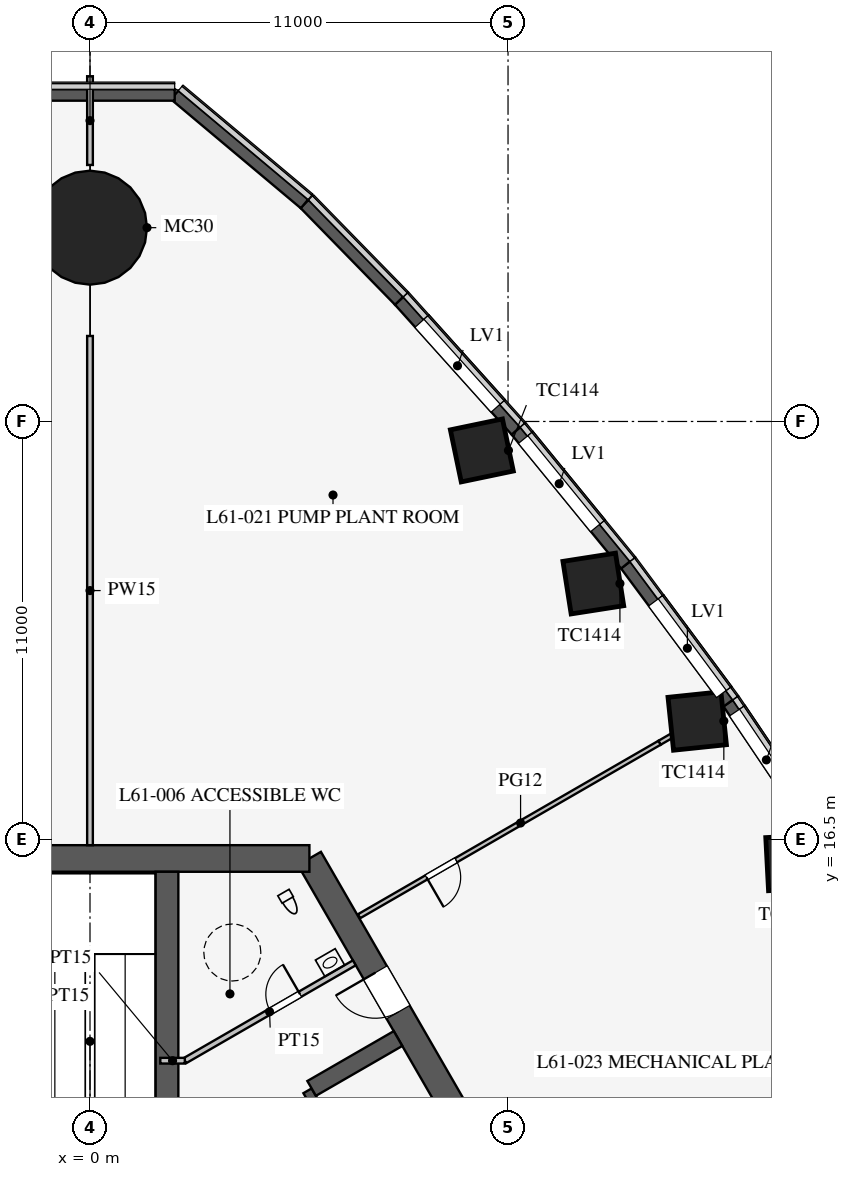
"""IFC4 building model, lengths in metres.
Left out: names, types, materials, properties, quantities, classifications, styles, units other than length and angle.
Written with IfcOpenShell. Run it as: python <this file> out.ifc"""

import sys

from ifc_helpers import new_model, si_unit, direction, frame, frame_2d, origin, origin_2d, place, context, subcontext, project, spatial, polyline, rectangle, circle, outline, extrude, clip, halfspace, element, fill, save


model = new_model("IFC4")
c1 = context("Model", 3, precision=1e-05, world=origin(), true_north=direction((0.0, 1.0)))
c2 = subcontext(c1, "Body", "Model", "MODEL_VIEW")
j1 = project(units=[si_unit("LENGTHUNIT", "METRE"), si_unit("PLANEANGLEUNIT", "RADIAN")], contexts=[c1])
p1 = place(None, origin())
s1 = spatial("IfcSite", under=j1, at=p1, CompositionType="ELEMENT")
p2 = place(p1, origin())
s2 = spatial("IfcBuilding", under=s1, at=p2, CompositionType="ELEMENT")
p3 = place(p2, frame((0.0, 0.0, 265.3)))
s3 = spatial("IfcBuildingStorey", under=s2, at=p3, CompositionType="ELEMENT", Elevation=265.3)
p4 = place(p3, frame((18.748, 16.02, 0.0), z_axis=(-0.187766955789, -0.108401950994, 0.976213392315), x_axis=(-0.543261997309, 0.839487539175, -0.01127270373)))
e1 = element("IfcColumn", 1, at=p4, inside=s3, PredefinedType="COLUMN", context=c2, shape_type="Clipping", body=[
    clip(clip(extrude(rectangle(XDim=1.4, YDim=1.4, at=origin_2d()), origin(), (0.0, 0.0, 1.0), 6.146), halfspace(frame((0.0, 0.0, 0.164), z_axis=(-5.122421756978066e-06, -9.263174689327915e-06, 0.9999999999439773), x_axis=(0.0, 0.9999999999570969, 9.263174689449444e-06)), True)), halfspace(frame((0.0, 0.0, 5.982), z_axis=(5.122421756978066e-06, 9.263174689327915e-06, -0.9999999999439773), x_axis=(0.0, -0.9999999999570969, -9.263174689449444e-06)), True)),
])
p5 = place(p3, frame((16.227, 19.761, 0.0), z_axis=(-0.201282046639, -0.116233851942, 0.972612579275), x_axis=(-0.584672708009, 0.810911567532, -0.024088465132)))
e2 = element("IfcColumn", 2, at=p5, inside=s3, PredefinedType="COLUMN", context=c2, shape_type="Clipping", body=[
    clip(clip(extrude(rectangle(XDim=1.4, YDim=1.4, at=origin_2d()), origin(), (0.0, 0.0, 1.0), 6.169), halfspace(frame((0.0, 0.0, 0.185), z_axis=(1.9384733546467386e-05, -1.123718108159144e-05, 0.999999999748979), x_axis=(0.0, 0.999999999936863, 1.1237181083702726e-05)), True)), halfspace(frame((0.0, 0.0, 5.984), z_axis=(-1.9384733546467386e-05, 1.123718108159144e-05, -0.999999999748979), x_axis=(0.0, -0.999999999936863, -1.1237181083702726e-05)), True)),
])
p6 = place(p3, frame((13.522, 23.396, 0.0), z_axis=(-0.223892186637, -0.129241135826, 0.966006737851), x_axis=(-0.623193661638, 0.78104689372, -0.039942582606)))
e3 = element("IfcColumn", 3, at=p6, inside=s3, PredefinedType="COLUMN", context=c2, shape_type="Clipping", body=[
    clip(clip(extrude(rectangle(XDim=1.4, YDim=1.4, at=origin_2d()), origin(), (0.0, 0.0, 1.0), 6.211), halfspace(frame((0.0, 0.0, 0.215), z_axis=(-2.063244910444073e-05, -2.579208150971235e-06, 0.9999999997838249), x_axis=(0.0, 0.9999999999966739, 2.579208151520217e-06)), True)), halfspace(frame((0.0, 0.0, 5.996), z_axis=(2.063244910444073e-05, 2.579208150971235e-06, -0.9999999997838249), x_axis=(0.0, -0.9999999999966739, -2.579208151520217e-06)), True)),
])
p7 = place(p3, frame((10.632, 26.923, 0.0), z_axis=(-0.255546793754, -0.147542991373, 0.955472083265), x_axis=(-0.65837980311, 0.750272089652, -0.060231439844)))
e4 = element("IfcColumn", 4, at=p7, inside=s3, PredefinedType="COLUMN", context=c2, shape_type="Clipping", body=[
    clip(clip(extrude(rectangle(XDim=1.4, YDim=1.4, at=origin_2d()), origin(), (0.0, 0.0, 1.0), 6.28), halfspace(frame((0.0, 0.0, 0.257), z_axis=(-2.541375274736635e-06, -2.483352466137179e-05, 0.9999999996884188), x_axis=(0.0, 0.9999999996916481, 2.4833524661451983e-05)), True)), halfspace(frame((0.0, 0.0, 6.023), z_axis=(2.541375274736635e-06, 2.483352466137179e-05, -0.9999999996884188), x_axis=(0.0, -0.9999999996916481, -2.4833524661451983e-05)), True)),
])
p8 = place(p3, frame((0.0, 33.0, 0.0), z_axis=(0.0, -0.316227766017, 0.948683298051), x_axis=(1.0, 0.0, 0.0)))
e5 = element("IfcColumn", 5, at=p8, inside=s3, PredefinedType="COLUMN", context=c2, shape_type="Clipping", body=[
    clip(clip(extrude(circle(Radius=1.5, at=origin_2d()), origin(), (0.0, 0.0, 1.0), 6.324), halfspace(frame((0.0, 0.0, 0.501), z_axis=(0.0, 0.0, 1.0), x_axis=(0.0, 1.0, 0.0)), True)), halfspace(frame((0.0, 0.0, 5.823), z_axis=(0.0, 0.0, -1.0), x_axis=(0.0, -1.0, 0.0)), True)),
])
p9 = place(p3, frame((16.743, -3.0, 0.0), z_axis=(0.0, 0.0, 1.0), x_axis=(-0.500002442456, 0.866023993627, 0.0)))
e6 = element("IfcWall", 6, at=p9, inside=s3, PredefinedType="SHEAR", context=c2, shape_type="SweptSolid", body=[
    extrude(rectangle(XDim=21.939, YDim=0.7, at=frame_2d((10.97, 0.0))), origin(), (0.0, 0.0, 1.0), 6.0),
])
p10 = place(p9, frame((17.27, 0.0, 0.0)))
e7 = element("IfcOpeningElement", 7, at=p10, cuts=e6, PredefinedType="OPENING", context=c2, shape_type="SweptSolid", body=[
    extrude(rectangle(XDim=1.2, YDim=2.1, at=frame_2d((0.6, 1.05))), frame((0.0, 0.36, 0.0), z_axis=(0.0, -1.0, 0.0), x_axis=(1.0, 0.0, 0.0)), (0.0, 0.0, 1.0), 0.72),
])
p11 = place(p9, frame((3.47, 0.0, 0.0)))
e8 = element("IfcOpeningElement", 8, at=p11, cuts=e6, PredefinedType="OPENING", context=c2, shape_type="SweptSolid", body=[
    extrude(rectangle(XDim=1.2, YDim=2.1, at=frame_2d((0.6, 1.05))), frame((0.0, 0.36, 0.0), z_axis=(0.0, -1.0, 0.0), x_axis=(1.0, 0.0, 0.0)), (0.0, 0.0, 1.0), 0.72),
])
p12 = place(p3, frame((5.773, 16.0, 0.0), z_axis=(0.0, 0.0, 1.0), x_axis=(-1.0, 0.0, 0.0)))
e9 = element("IfcWall", 9, at=p12, inside=s3, PredefinedType="SHEAR", context=c2, shape_type="SweptSolid", body=[
    extrude(rectangle(XDim=11.547, YDim=0.7, at=frame_2d((5.773, 0.0))), origin(), (0.0, 0.0, 1.0), 6.0),
])
p13 = place(p3, frame((11.424, 0.014, 0.0), z_axis=(0.0, 0.0, 1.0), x_axis=(-0.500001763848, 0.866024385424, 0.0)))
e10 = element("IfcWall", 10, at=p13, inside=s3, PredefinedType="SHEAR", context=c2, shape_type="SweptSolid", body=[
    extrude(rectangle(XDim=11.4, YDim=0.25, at=frame_2d((5.7, 0.0))), origin(), (0.0, 0.0, 1.0), 6.0),
])
p14 = place(p13, frame((0.975, 0.0, 0.0)))
e11 = element("IfcOpeningElement", 11, at=p14, cuts=e10, PredefinedType="OPENING", context=c2, shape_type="SweptSolid", body=[
    extrude(rectangle(XDim=0.9, YDim=2.1, at=frame_2d((0.45, 1.05))), frame((0.0, 0.135, 0.0), z_axis=(0.0, -1.0, 0.0), x_axis=(1.0, 0.0, 0.0)), (0.0, 0.0, 1.0), 0.27),
])
p15 = place(p13, frame((3.825, 0.0, 0.0)))
e12 = element("IfcOpeningElement", 12, at=p15, cuts=e10, PredefinedType="OPENING", context=c2, shape_type="SweptSolid", body=[
    extrude(rectangle(XDim=0.9, YDim=2.1, at=frame_2d((0.45, 1.05))), frame((0.0, 0.135, 0.0), z_axis=(0.0, -1.0, 0.0), x_axis=(1.0, 0.0, 0.0)), (0.0, 0.0, 1.0), 0.27),
])
p16 = place(p13, frame((6.675, 0.0, 0.0)))
e13 = element("IfcOpeningElement", 13, at=p16, cuts=e10, PredefinedType="OPENING", context=c2, shape_type="SweptSolid", body=[
    extrude(rectangle(XDim=0.9, YDim=2.1, at=frame_2d((0.45, 1.05))), frame((0.0, 0.135, 0.0), z_axis=(0.0, -1.0, 0.0), x_axis=(1.0, 0.0, 0.0)), (0.0, 0.0, 1.0), 0.27),
])
p17 = place(p13, frame((9.525, 0.0, 0.0)))
e14 = element("IfcOpeningElement", 14, at=p17, cuts=e10, PredefinedType="OPENING", context=c2, shape_type="SweptSolid", body=[
    extrude(rectangle(XDim=0.9, YDim=2.1, at=frame_2d((0.45, 1.05))), frame((0.0, 0.135, 0.0), z_axis=(0.0, -1.0, 0.0), x_axis=(1.0, 0.0, 0.0)), (0.0, 0.0, 1.0), 0.27),
])
p18 = place(p3, frame((5.832, 9.949, 0.0), z_axis=(0.0, 0.0, 1.0), x_axis=(0.866036909293, 0.499980071345, 0.0)))
e15 = element("IfcWall", 15, at=p18, inside=s3, PredefinedType="SHEAR", context=c2, shape_type="SweptSolid", body=[
    extrude(rectangle(XDim=2.625, YDim=0.45, at=frame_2d((1.312, 0.0))), origin(), (0.0, 0.0, 1.0), 6.0),
])
p19 = place(p3, frame((2.025, 6.525, 0.0), z_axis=(0.0, 0.0, 1.0), x_axis=(0.0, 1.0, 0.0)))
e16 = element("IfcWall", 16, at=p19, inside=s3, PredefinedType="SHEAR", context=c2, shape_type="SweptSolid", body=[
    extrude(rectangle(XDim=9.125, YDim=0.6, at=frame_2d((4.562, 0.0))), origin(), (0.0, 0.0, 1.0), 6.0),
])
p20 = place(p3, frame((19.312, 16.346, 0.0), z_axis=(0.0, 0.0, 1.0), x_axis=(-0.558466624917, 0.829526991034, 0.0)))
e17 = element("IfcWall", 17, at=p20, inside=s3, PredefinedType="SOLIDWALL", context=c2, shape_type="SweptSolid", body=[
    extrude(rectangle(XDim=4.511, YDim=0.3, at=frame_2d((2.255, 0.0))), origin(), (0.0, 0.0, 1.0), 5.8),
])
p21 = place(p20, frame((1.211, 0.0, 3.5)))
e18 = element("IfcOpeningElement", 18, at=p21, cuts=e17, PredefinedType="OPENING", context=c2, shape_type="SweptSolid", body=[
    extrude(rectangle(XDim=3.0, YDim=2.0, at=frame_2d((1.5, 1.0))), frame((0.0, 0.16, 0.0), z_axis=(0.0, -1.0, 0.0), x_axis=(1.0, 0.0, 0.0)), (0.0, 0.0, 1.0), 0.32),
])
p22 = place(p3, frame((16.792, 20.087, 0.0), z_axis=(0.0, 0.0, 1.0), x_axis=(-0.596173167565, 0.802855873912, 0.0)))
e19 = element("IfcWall", 19, at=p22, inside=s3, PredefinedType="SOLIDWALL", context=c2, shape_type="SweptSolid", body=[
    extrude(rectangle(XDim=4.53, YDim=0.3, at=frame_2d((2.265, 0.0))), origin(), (0.0, 0.0, 1.0), 5.8),
])
p23 = place(p22, frame((0.3, 0.0, 3.5)))
e20 = element("IfcOpeningElement", 20, at=p23, cuts=e19, PredefinedType="OPENING", context=c2, shape_type="SweptSolid", body=[
    extrude(rectangle(XDim=3.0, YDim=2.0, at=frame_2d((1.5, 1.0))), frame((0.0, 0.16, 0.0), z_axis=(0.0, -1.0, 0.0), x_axis=(1.0, 0.0, 0.0)), (0.0, 0.0, 1.0), 0.32),
])
p24 = place(p3, frame((14.092, 23.724, 0.0), z_axis=(0.0, 0.0, 1.0), x_axis=(-0.632765292047, 0.774343647989, 0.0)))
e21 = element("IfcWall", 21, at=p24, inside=s3, PredefinedType="SOLIDWALL", context=c2, shape_type="SweptSolid", body=[
    extrude(rectangle(XDim=4.559, YDim=0.3, at=frame_2d((2.28, 0.0))), origin(), (0.0, 0.0, 1.0), 5.8),
])
p25 = place(p24, frame((1.259, 0.0, 3.5)))
e22 = element("IfcOpeningElement", 22, at=p25, cuts=e21, PredefinedType="OPENING", context=c2, shape_type="SweptSolid", body=[
    extrude(rectangle(XDim=3.0, YDim=2.0, at=frame_2d((1.5, 1.0))), frame((0.0, 0.16, 0.0), z_axis=(0.0, -1.0, 0.0), x_axis=(1.0, 0.0, 0.0)), (0.0, 0.0, 1.0), 0.32),
])
p26 = place(p3, frame((11.207, 27.255, 0.0), z_axis=(0.0, 0.0, 1.0), x_axis=(-0.668245909458, 0.743940457626, 0.0)))
e23 = element("IfcWall", 23, at=p26, inside=s3, PredefinedType="SOLIDWALL", context=c2, shape_type="SweptSolid", body=[
    extrude(rectangle(XDim=4.599, YDim=0.3, at=frame_2d((2.3, 0.0))), origin(), (0.0, 0.0, 1.0), 5.8),
])
p27 = place(p26, frame((0.8, 0.0, 3.5)))
e24 = element("IfcOpeningElement", 24, at=p27, cuts=e23, PredefinedType="OPENING", context=c2, shape_type="SweptSolid", body=[
    extrude(rectangle(XDim=3.0, YDim=2.0, at=frame_2d((1.5, 1.0))), frame((0.0, 0.16, 0.0), z_axis=(0.0, -1.0, 0.0), x_axis=(1.0, 0.0, 0.0)), (0.0, 0.0, 1.0), 0.32),
])
p28 = place(p3, frame((8.133, 30.677, 0.0), z_axis=(0.0, 0.0, 1.0), x_axis=(-0.698630261643, 0.715482884154, 0.0)))
e25 = element("IfcWall", 25, at=p28, inside=s3, PredefinedType="SOLIDWALL", context=c2, shape_type="SweptSolid", body=[
    extrude(rectangle(XDim=3.564, YDim=0.3, at=frame_2d((1.782, 0.0))), origin(), (0.0, 0.0, 1.0), 5.8),
])
for number, where, z_axis, x_axis in (
    (26, (5.644, 33.226, 0.0), (0.0, 0.0, 1.0), (-0.766, 0.643, 0.0)),
    (27, (2.229, 36.092, 0.0), (0.0, 0.0, 1.0), (-1.0, 0.0, 0.0)),
):
    element("IfcWall", number, at=place(p3, frame(where, z_axis=z_axis, x_axis=x_axis)), inside=s3, PredefinedType="SOLIDWALL", context=c2, shape_type="SweptSolid", body=[
        extrude(rectangle(XDim=4.458, YDim=0.3, at=frame_2d((2.229, 0.0))), origin(), (0.0, 0.0, 1.0), 5.8),
    ])
p29 = place(p3, frame((2.495, 10.678, 0.0), z_axis=(0.0, 0.0, 1.0), x_axis=(0.866037967349, 0.499978238636, 0.0)))
e28 = element("IfcWall", 28, at=p29, inside=s3, PredefinedType="PARTITIONING", context=c2, shape_type="SweptSolid", body=[
    extrude(rectangle(XDim=5.15, YDim=0.15, at=frame_2d((2.575, 0.0))), origin(), (0.0, 0.0, 1.0), 5.8),
])
p30 = place(p29, frame((2.6, 0.0, 0.0)))
e29 = element("IfcOpeningElement", 29, at=p30, cuts=e28, PredefinedType="OPENING", context=c2, shape_type="SweptSolid", body=[
    extrude(rectangle(XDim=0.9, YDim=2.1, at=frame_2d((0.45, 1.05))), frame((0.0, 0.085, 0.0), z_axis=(0.0, -1.0, 0.0), x_axis=(1.0, 0.0, 0.0)), (0.0, 0.0, 1.0), 0.17),
])
p31 = place(p3, frame((2.495, 10.678, 0.0), z_axis=(0.0, 0.0, 1.0), x_axis=(-1.0, 0.0, 0.0)))
e30 = element("IfcWall", 30, at=p31, inside=s3, PredefinedType="PARTITIONING", context=c2, shape_type="SweptSolid", body=[
    extrude(rectangle(XDim=0.645, YDim=0.15, at=frame_2d((0.323, 0.0))), origin(), (0.0, 0.0, 1.0), 5.8),
])
p32 = place(p3, frame((0.0, 16.35, 0.0), z_axis=(0.0, 0.0, 1.0), x_axis=(0.0, 1.0, 0.0)))
e31 = element("IfcWall", 31, at=p32, inside=s3, PredefinedType="PARTITIONING", context=c2, shape_type="SweptSolid", body=[
    extrude(rectangle(XDim=13.4, YDim=0.15, at=frame_2d((6.7, 0.0))), origin(), (0.0, 0.0, 1.0), 4.3),
])
p33 = place(p3, frame((0.0, 34.25, 0.0), z_axis=(0.0, 0.0, 1.0), x_axis=(0.0, 1.0, 0.0)))
e32 = element("IfcWall", 32, at=p33, inside=s3, PredefinedType="PARTITIONING", context=c2, shape_type="SweptSolid", body=[
    extrude(rectangle(XDim=2.335, YDim=0.15, at=frame_2d((1.167, 0.0))), origin(), (0.0, 0.0, 1.0), 5.8),
])
p34 = place(p3, frame((14.986, 19.044, 0.0), z_axis=(0.0, 0.0, 1.0), x_axis=(0.865984622623, 0.500070628392, 0.0)))
e33 = element("IfcWall", 33, at=p34, inside=s3, PredefinedType="PARTITIONING", context=c2, shape_type="SweptSolid", body=[
    extrude(outline(polyline([(0.0, 0.0), (0.688, 0.0), (0.688, 0.05), (0.0, 2.9), (0.0, 0.0)])), frame((0.0, 0.06, 0.0), z_axis=(0.0, -1.0, 0.0), x_axis=(1.0, 0.0, 0.0)), (0.0, 0.0, 1.0), 0.12),
])
p35 = place(p3, frame((7.079, 14.479, 0.0), z_axis=(0.0, 0.0, 1.0), x_axis=(0.866026165896, 0.499998679983, 0.0)))
e34 = element("IfcWall", 34, at=p35, inside=s3, PredefinedType="PARTITIONING", context=c2, shape_type="SweptSolid", body=[
    extrude(rectangle(XDim=9.13, YDim=0.12, at=frame_2d((4.565, 0.0))), origin(), (0.0, 0.0, 1.0), 2.9),
])
p36 = place(p35, frame((2.05, 0.0, 0.0)))
e35 = element("IfcOpeningElement", 35, at=p36, cuts=e34, PredefinedType="OPENING", context=c2, shape_type="SweptSolid", body=[
    extrude(rectangle(XDim=0.9, YDim=2.1, at=frame_2d((0.45, 1.05))), frame((0.0, 0.07, 0.0), z_axis=(0.0, -1.0, 0.0), x_axis=(1.0, 0.0, 0.0)), (0.0, 0.0, 1.0), 0.14),
])
p37 = place(p21, origin())
e36 = element("IfcWindow", 36, at=p37, inside=s3, PartitioningType="SINGLE_PANEL", PredefinedType="USERDEFINED", context=c2, shape_type="SweptSolid", body=[
    extrude(rectangle(XDim=3.0, YDim=2.0, at=frame_2d((1.5, 1.0))), frame((0.0, 0.03, 0.0), z_axis=(0.0, -1.0, 0.0), x_axis=(1.0, 0.0, 0.0)), (0.0, 0.0, 1.0), 0.06),
])
fill(e18, e36)
p38 = place(p23, origin())
e37 = element("IfcWindow", 37, at=p38, inside=s3, PartitioningType="SINGLE_PANEL", PredefinedType="USERDEFINED", context=c2, shape_type="SweptSolid", body=[
    extrude(rectangle(XDim=3.0, YDim=2.0, at=frame_2d((1.5, 1.0))), frame((0.0, 0.03, 0.0), z_axis=(0.0, -1.0, 0.0), x_axis=(1.0, 0.0, 0.0)), (0.0, 0.0, 1.0), 0.06),
])
fill(e20, e37)
p39 = place(p25, origin())
e38 = element("IfcWindow", 38, at=p39, inside=s3, PartitioningType="SINGLE_PANEL", PredefinedType="USERDEFINED", context=c2, shape_type="SweptSolid", body=[
    extrude(rectangle(XDim=3.0, YDim=2.0, at=frame_2d((1.5, 1.0))), frame((0.0, 0.03, 0.0), z_axis=(0.0, -1.0, 0.0), x_axis=(1.0, 0.0, 0.0)), (0.0, 0.0, 1.0), 0.06),
])
fill(e22, e38)
p40 = place(p27, origin())
e39 = element("IfcWindow", 39, at=p40, inside=s3, PartitioningType="SINGLE_PANEL", PredefinedType="USERDEFINED", context=c2, shape_type="SweptSolid", body=[
    extrude(rectangle(XDim=3.0, YDim=2.0, at=frame_2d((1.5, 1.0))), frame((0.0, 0.03, 0.0), z_axis=(0.0, -1.0, 0.0), x_axis=(1.0, 0.0, 0.0)), (0.0, 0.0, 1.0), 0.06),
])
fill(e24, e39)
p41 = place(p30, origin())
e40 = element("IfcDoor", 40, at=p41, inside=s3, OperationType="SINGLE_SWING_RIGHT", PredefinedType="DOOR", context=c2, shape_type="SweptSolid", body=[
    extrude(rectangle(XDim=0.9, YDim=2.1, at=frame_2d((0.45, 1.05))), frame((0.0, 0.025, 0.0), z_axis=(0.0, -1.0, 0.0), x_axis=(1.0, 0.0, 0.0)), (0.0, 0.0, 1.0), 0.05),
])
fill(e29, e40)
p42 = place(p10, origin())
e41 = element("IfcDoor", 41, at=p42, inside=s3, OperationType="SINGLE_SWING_RIGHT", PredefinedType="DOOR", context=c2, shape_type="SweptSolid", body=[
    extrude(rectangle(XDim=1.2, YDim=2.1, at=frame_2d((0.6, 1.05))), frame((0.0, 0.025, 0.0), z_axis=(0.0, -1.0, 0.0), x_axis=(1.0, 0.0, 0.0)), (0.0, 0.0, 1.0), 0.05),
])
fill(e7, e41)
p43 = place(p36, frame((0.9, 0.0, 0.0), z_axis=(0.0, 0.0, 1.0), x_axis=(-1.0, 0.0, 0.0)))
e42 = element("IfcDoor", 42, at=p43, inside=s3, OperationType="SINGLE_SWING_RIGHT", PredefinedType="DOOR", context=c2, shape_type="SweptSolid", body=[
    extrude(rectangle(XDim=0.9, YDim=2.1, at=frame_2d((0.45, 1.05))), frame((0.0, 0.025, 0.0), z_axis=(0.0, -1.0, 0.0), x_axis=(1.0, 0.0, 0.0)), (0.0, 0.0, 1.0), 0.05),
])
fill(e35, e42)
save(model, sys.argv[1])
